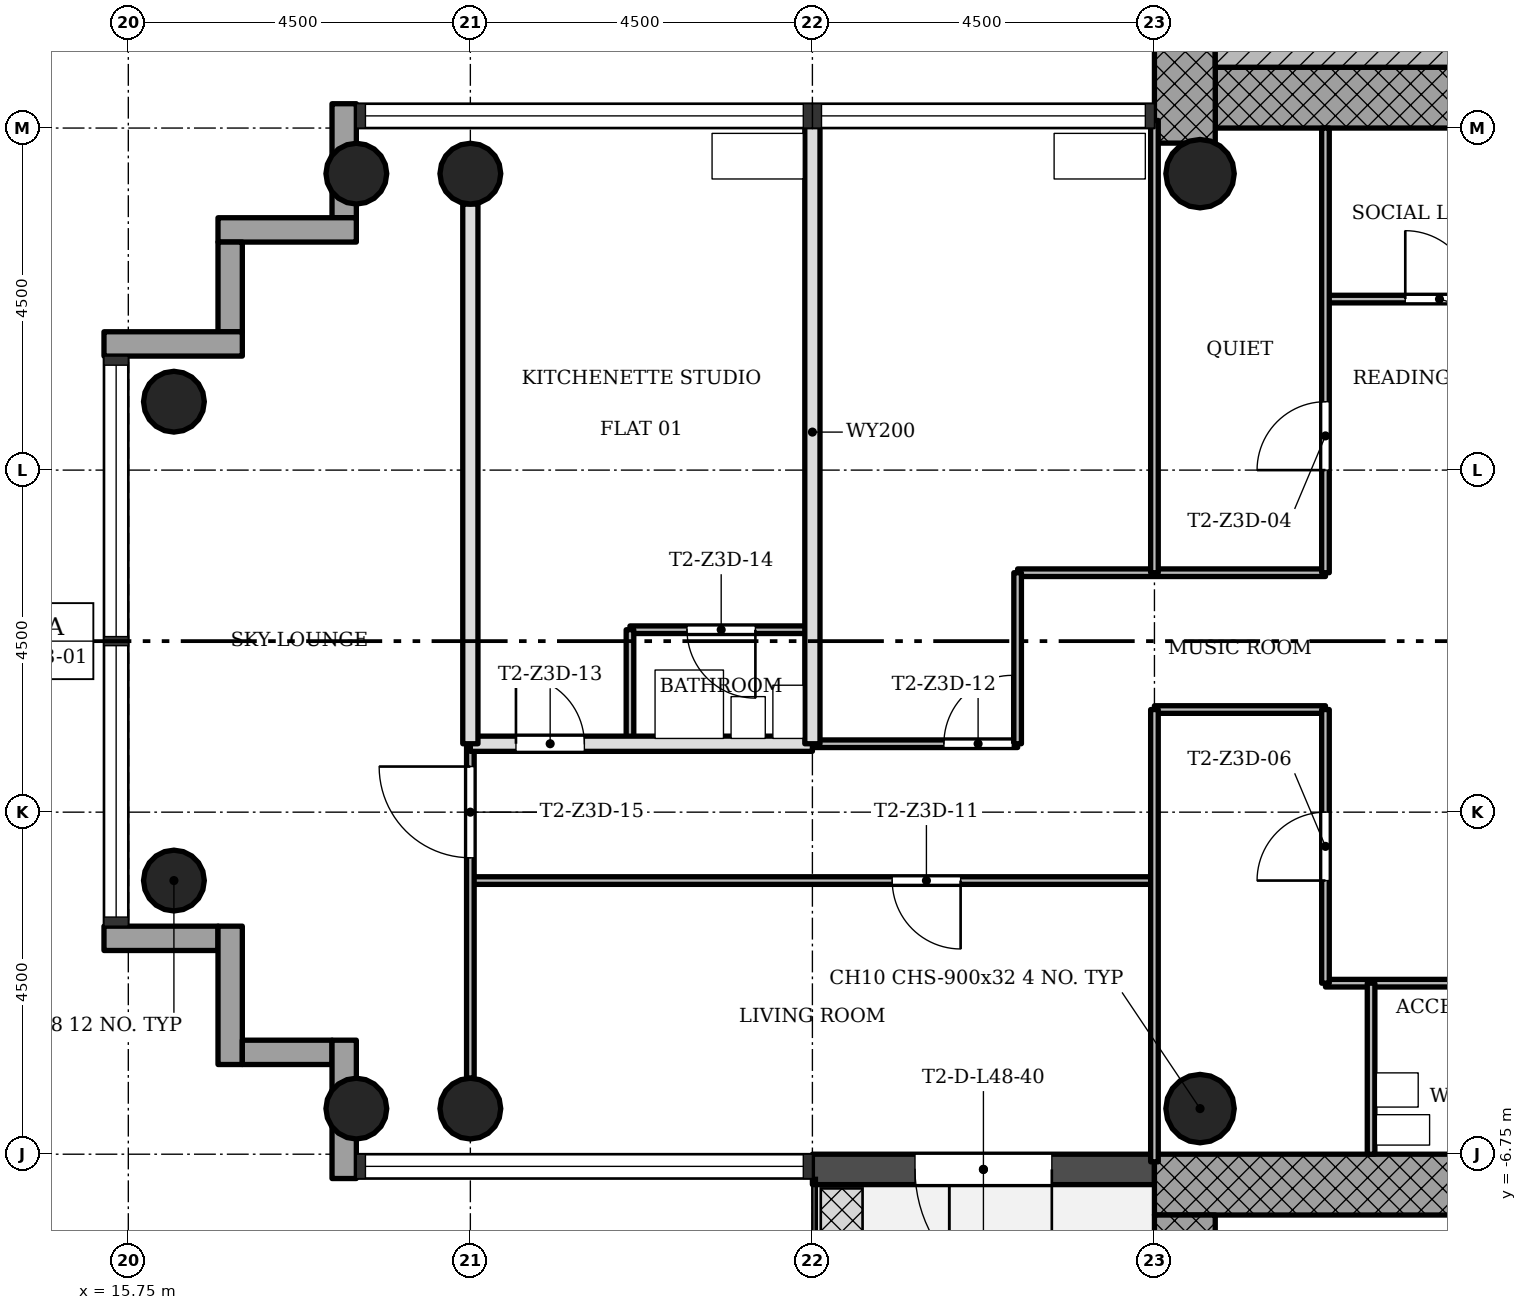
"""IFC4 building model, lengths in metres.
Left out: names, types, materials, properties, quantities, classifications, styles, units other than length and angle.
Written with IfcOpenShell. Run it as: python <this file> out.ifc"""

import sys

from ifc_helpers import new_model, si_unit, direction, frame, frame_2d, origin, origin_2d, place, context, subcontext, project, spatial, rectangle, hollow_circle, extrude, element, fill, save


model = new_model("IFC4")
c1 = context("Model", 3, precision=1e-05, world=origin(), true_north=direction((0.0, 1.0)))
c2 = subcontext(c1, "Body", "Model", "MODEL_VIEW")
j1 = project(units=[si_unit("LENGTHUNIT", "METRE"), si_unit("PLANEANGLEUNIT", "RADIAN")], contexts=[c1])
p1 = place(None, origin())
s1 = spatial("IfcSite", under=j1, at=p1, CompositionType="ELEMENT")
p2 = place(p1, origin())
s2 = spatial("IfcBuilding", under=s1, at=p2, CompositionType="ELEMENT")
p3 = place(p2, frame((0.0, 0.0, 174.5)))
s3 = spatial("IfcBuildingStorey", under=s2, at=p3, CompositionType="ELEMENT", Elevation=174.5)
p4 = place(p3, frame((30.05, 7.15, 0.0), z_axis=(0.0, 0.0, 1.0), x_axis=(1.0, 0.0, 0.0)))
e1 = element("IfcWall", 1, at=p4, inside=s3, PredefinedType="SHEAR", context=c2, shape_type="SweptSolid", body=[
    extrude(rectangle(XDim=12.7, YDim=0.8, at=frame_2d((6.35, 0.0))), origin(), (0.0, 0.0, 1.0), 3.4),
])
p5 = place(p4, frame((5.05, 0.0, 0.0)))
e2 = element("IfcOpeningElement", 2, at=p5, cuts=e1, PredefinedType="OPENING", context=c2, shape_type="SweptSolid", body=[
    extrude(rectangle(XDim=1.8, YDim=2.1, at=frame_2d((0.9, 1.05))), frame((0.0, 0.41, 0.0), z_axis=(0.0, -1.0, 0.0), x_axis=(1.0, 0.0, 0.0)), (0.0, 0.0, 1.0), 0.82),
])
p6 = place(p3, frame((29.65, 15.348, 0.0), z_axis=(0.0, 0.0, 1.0), x_axis=(0.0, -1.0, 0.0)))
e3 = element("IfcWall", 3, at=p6, inside=s3, PredefinedType="SHEAR", context=c2, shape_type="SweptSolid", body=[
    extrude(rectangle(XDim=8.796, YDim=0.8, at=frame_2d((4.398, 0.0))), origin(), (0.0, 0.0, 1.0), 3.4),
])
p7 = place(p3, frame((41.95, -7.15, 0.0), z_axis=(0.0, 0.0, 1.0), x_axis=(-1.0, 0.0, 0.0)))
e4 = element("IfcWall", 4, at=p7, inside=s3, PredefinedType="SHEAR", context=c2, shape_type="SweptSolid", body=[
    extrude(rectangle(XDim=12.7, YDim=0.8, at=frame_2d((6.35, 0.0))), origin(), (0.0, 0.0, 1.0), 3.4),
])
p8 = place(p7, frame((5.05, 0.0, 0.0)))
e5 = element("IfcOpeningElement", 5, at=p8, cuts=e4, PredefinedType="OPENING", context=c2, shape_type="SweptSolid", body=[
    extrude(rectangle(XDim=1.8, YDim=2.1, at=frame_2d((0.9, 1.05))), frame((0.0, 0.41, 0.0), z_axis=(0.0, -1.0, 0.0), x_axis=(1.0, 0.0, 0.0)), (0.0, 0.0, 1.0), 0.82),
])
p9 = place(p3, frame((29.65, -7.55, 0.0), z_axis=(0.0, 0.0, 1.0), x_axis=(0.0, -1.0, 0.0)))
e6 = element("IfcWall", 6, at=p9, inside=s3, PredefinedType="SHEAR", context=c2, shape_type="SweptSolid", body=[
    extrude(rectangle(XDim=8.2, YDim=0.8, at=frame_2d((4.1, 0.0))), origin(), (0.0, 0.0, 1.0), 3.4),
])
for number, where, z_axis, x_axis in (
    (7, (20.25, 6.15, 0.0), (0.0, 0.0, 1.0), (1.0, 0.0, 0.0)),
    (8, (20.25, -6.15, 0.0), (0.0, 0.0, 1.0), (1.0, 0.0, 0.0)),
    (9, (18.75, 6.15, 0.0), (0.0, 0.0, 1.0), (1.0, 0.0, 0.0)),
    (10, (18.75, -6.15, 0.0), (0.0, 0.0, 1.0), (1.0, 0.0, 0.0)),
    (11, (16.35, 3.15, 0.0), (0.0, 0.0, 1.0), (1.0, 0.0, 0.0)),
    (12, (16.35, -3.15, 0.0), (0.0, 0.0, 1.0), (1.0, 0.0, 0.0)),
):
    element("IfcColumn", number, at=place(p3, frame(where, z_axis=z_axis, x_axis=x_axis)), inside=s3, PredefinedType="COLUMN", context=c2, shape_type="SweptSolid", body=[
        extrude(hollow_circle(Radius=0.4, WallThickness=0.028, at=origin_2d()), origin(), (0.0, 0.0, 1.0), 3.4),
    ])
for number, where, z_axis, x_axis in (
    (13, (29.85, 6.15, 0.0), (0.0, 0.0, 1.0), (1.0, 0.0, 0.0)),
    (14, (29.85, -6.15, 0.0), (0.0, 0.0, 1.0), (1.0, 0.0, 0.0)),
):
    element("IfcColumn", number, at=place(p3, frame(where, z_axis=z_axis, x_axis=x_axis)), inside=s3, PredefinedType="COLUMN", context=c2, shape_type="SweptSolid", body=[
        extrude(hollow_circle(Radius=0.45, WallThickness=0.032, at=origin_2d()), origin(), (0.0, 0.0, 1.0), 3.4),
    ])
p10 = place(p3, frame((18.59, 7.07, -0.3), z_axis=(0.0, 0.0, 1.0), x_axis=(0.0, -1.0, 0.0)))
e15 = element("IfcWall", 15, at=p10, inside=s3, PredefinedType="STANDARD", context=c2, shape_type="SweptSolid", body=[
    extrude(rectangle(XDim=1.5, YDim=0.32, at=frame_2d((0.75, 0.0))), origin(), (0.0, 0.0, 1.0), 3.4),
])
p11 = place(p3, frame((18.75, 5.41, -0.3), z_axis=(0.0, 0.0, 1.0), x_axis=(-1.0, 0.0, 0.0)))
e16 = element("IfcWall", 16, at=p11, inside=s3, PredefinedType="STANDARD", context=c2, shape_type="SweptSolid", body=[
    extrude(rectangle(XDim=1.82, YDim=0.32, at=frame_2d((0.91, 0.0))), origin(), (0.0, 0.0, 1.0), 3.4),
])
p12 = place(p3, frame((17.09, 5.25, -0.3), z_axis=(0.0, 0.0, 1.0), x_axis=(0.0, -1.0, 0.0)))
e17 = element("IfcWall", 17, at=p12, inside=s3, PredefinedType="STANDARD", context=c2, shape_type="SweptSolid", body=[
    extrude(rectangle(XDim=1.18, YDim=0.32, at=frame_2d((0.59, 0.0))), origin(), (0.0, 0.0, 1.0), 3.4),
])
p13 = place(p3, frame((17.25, 3.91, -0.3), z_axis=(0.0, 0.0, 1.0), x_axis=(-1.0, 0.0, 0.0)))
e18 = element("IfcWall", 18, at=p13, inside=s3, PredefinedType="STANDARD", context=c2, shape_type="SweptSolid", body=[
    extrude(rectangle(XDim=1.82, YDim=0.32, at=frame_2d((0.91, 0.0))), origin(), (0.0, 0.0, 1.0), 3.4),
])
p14 = place(p3, frame((15.43, -3.91, -0.3), z_axis=(0.0, 0.0, 1.0), x_axis=(1.0, 0.0, 0.0)))
e19 = element("IfcWall", 19, at=p14, inside=s3, PredefinedType="STANDARD", context=c2, shape_type="SweptSolid", body=[
    extrude(rectangle(XDim=1.5, YDim=0.32, at=frame_2d((0.75, 0.0))), origin(), (0.0, 0.0, 1.0), 3.4),
])
p15 = place(p3, frame((17.09, -3.75, -0.3), z_axis=(0.0, 0.0, 1.0), x_axis=(0.0, -1.0, 0.0)))
e20 = element("IfcWall", 20, at=p15, inside=s3, PredefinedType="STANDARD", context=c2, shape_type="SweptSolid", body=[
    extrude(rectangle(XDim=1.82, YDim=0.32, at=frame_2d((0.91, 0.0))), origin(), (0.0, 0.0, 1.0), 3.4),
])
p16 = place(p3, frame((17.25, -5.41, -0.3), z_axis=(0.0, 0.0, 1.0), x_axis=(1.0, 0.0, 0.0)))
e21 = element("IfcWall", 21, at=p16, inside=s3, PredefinedType="STANDARD", context=c2, shape_type="SweptSolid", body=[
    extrude(rectangle(XDim=1.18, YDim=0.32, at=frame_2d((0.59, 0.0))), origin(), (0.0, 0.0, 1.0), 3.4),
])
p17 = place(p3, frame((18.59, -5.25, -0.3), z_axis=(0.0, 0.0, 1.0), x_axis=(0.0, -1.0, 0.0)))
e22 = element("IfcWall", 22, at=p17, inside=s3, PredefinedType="STANDARD", context=c2, shape_type="SweptSolid", body=[
    extrude(rectangle(XDim=1.82, YDim=0.32, at=frame_2d((0.91, 0.0))), origin(), (0.0, 0.0, 1.0), 3.4),
])
p18 = place(p3, frame((24.75, -6.95, -0.02), z_axis=(0.0, 0.0, 1.0), x_axis=(1.0, 0.0, 0.0)))
e23 = element("IfcWall", 23, at=p18, inside=s3, PredefinedType="STANDARD", context=c2, shape_type="SweptSolid", body=[
    extrude(rectangle(XDim=4.5, YDim=0.4, at=frame_2d((2.25, 0.0))), origin(), (0.0, 0.0, 1.0), 3.12),
])
p19 = place(p18, frame((1.35, 0.0, 0.02)))
e24 = element("IfcOpeningElement", 24, at=p19, cuts=e23, PredefinedType="OPENING", context=c2, shape_type="SweptSolid", body=[
    extrude(rectangle(XDim=1.8, YDim=2.1, at=frame_2d((0.9, 1.05))), frame((0.0, 0.21, 0.0), z_axis=(0.0, -1.0, 0.0), x_axis=(1.0, 0.0, 0.0)), (0.0, 0.0, 1.0), 0.42),
])
p20 = place(p3, frame((34.5, -4.5, 0.0), z_axis=(0.0, 0.0, 1.0), x_axis=(-1.0, 0.0, 0.0)))
e25 = element("IfcWall", 25, at=p20, inside=s3, PredefinedType="PARTITIONING", context=c2, shape_type="SweptSolid", body=[
    extrude(rectangle(XDim=3.0, YDim=0.1, at=frame_2d((1.5, 0.0))), origin(), (0.0, 0.0, 1.0), 3.0),
])
p21 = place(p3, frame((29.25, -3.15, 0.0), z_axis=(0.0, 0.0, 1.0), x_axis=(-1.0, 0.0, 0.0)))
e26 = element("IfcWall", 26, at=p21, inside=s3, PredefinedType="PARTITIONING", context=c2, shape_type="SweptSolid", body=[
    extrude(rectangle(XDim=9.0, YDim=0.1, at=frame_2d((4.5, 0.0))), origin(), (0.0, 0.0, 1.0), 3.0),
])
p22 = place(p21, frame((2.55, 0.0, 0.0)))
e27 = element("IfcOpeningElement", 27, at=p22, cuts=e26, PredefinedType="OPENING", context=c2, shape_type="SweptSolid", body=[
    extrude(rectangle(XDim=0.9, YDim=2.1, at=frame_2d((0.45, 1.05))), frame((0.0, 0.06, 0.0), z_axis=(0.0, -1.0, 0.0), x_axis=(1.0, 0.0, 0.0)), (0.0, 0.0, 1.0), 0.12),
])
p23 = place(p3, frame((27.45, -1.35, 0.0), z_axis=(0.0, 0.0, 1.0), x_axis=(-1.0, 0.0, 0.0)))
e28 = element("IfcWall", 28, at=p23, inside=s3, PredefinedType="PARTITIONING", context=c2, shape_type="SweptSolid", body=[
    extrude(rectangle(XDim=2.7, YDim=0.1, at=frame_2d((1.35, 0.0))), origin(), (0.0, 0.0, 1.0), 3.0),
])
p24 = place(p23, frame((0.07, 0.0, 0.0)))
e29 = element("IfcOpeningElement", 29, at=p24, cuts=e28, PredefinedType="OPENING", context=c2, shape_type="SweptSolid", body=[
    extrude(rectangle(XDim=0.9, YDim=2.1, at=frame_2d((0.45, 1.05))), frame((0.0, 0.06, 0.0), z_axis=(0.0, -1.0, 0.0), x_axis=(1.0, 0.0, 0.0)), (0.0, 0.0, 1.0), 0.12),
])
p25 = place(p3, frame((24.75, -1.35, 0.0), z_axis=(0.0, 0.0, 1.0), x_axis=(-1.0, 0.0, 0.0)))
e30 = element("IfcWall", 30, at=p25, inside=s3, PredefinedType="SOLIDWALL", context=c2, shape_type="SweptSolid", body=[
    extrude(rectangle(XDim=4.5, YDim=0.2, at=frame_2d((2.25, 0.0))), origin(), (0.0, 0.0, 1.0), 3.0),
])
p26 = place(p25, frame((3.0, 0.0, 0.0)))
e31 = element("IfcOpeningElement", 31, at=p26, cuts=e30, PredefinedType="OPENING", context=c2, shape_type="SweptSolid", body=[
    extrude(rectangle(XDim=0.9, YDim=2.1, at=frame_2d((0.45, 1.05))), frame((0.0, 0.11, 0.0), z_axis=(0.0, -1.0, 0.0), x_axis=(1.0, 0.0, 0.0)), (0.0, 0.0, 1.0), 0.22),
])
p27 = place(p3, frame((31.5, -0.9, 0.0), z_axis=(0.0, 0.0, 1.0), x_axis=(-1.0, 0.0, 0.0)))
e32 = element("IfcWall", 32, at=p27, inside=s3, PredefinedType="PARTITIONING", context=c2, shape_type="SweptSolid", body=[
    extrude(rectangle(XDim=2.25, YDim=0.1, at=frame_2d((1.125, 0.0))), origin(), (0.0, 0.0, 1.0), 3.0),
])
p28 = place(p3, frame((24.75, 0.15, 0.0), z_axis=(0.0, 0.0, 1.0), x_axis=(-1.0, 0.0, 0.0)))
e33 = element("IfcWall", 33, at=p28, inside=s3, PredefinedType="PARTITIONING", context=c2, shape_type="SweptSolid", body=[
    extrude(rectangle(XDim=2.4, YDim=0.1, at=frame_2d((1.2, 0.0))), origin(), (0.0, 0.0, 1.0), 3.0),
])
p29 = place(p28, frame((0.75, 0.0, 0.0)))
e34 = element("IfcOpeningElement", 34, at=p29, cuts=e33, PredefinedType="OPENING", context=c2, shape_type="SweptSolid", body=[
    extrude(rectangle(XDim=0.9, YDim=2.1, at=frame_2d((0.45, 1.05))), frame((0.0, 0.06, 0.0), z_axis=(0.0, -1.0, 0.0), x_axis=(1.0, 0.0, 0.0)), (0.0, 0.0, 1.0), 0.12),
])
p30 = place(p3, frame((31.5, 0.9, 0.0), z_axis=(0.0, 0.0, 1.0), x_axis=(-1.0, 0.0, 0.0)))
e35 = element("IfcWall", 35, at=p30, inside=s3, PredefinedType="PARTITIONING", context=c2, shape_type="SweptSolid", body=[
    extrude(rectangle(XDim=4.05, YDim=0.1, at=frame_2d((2.025, 0.0))), origin(), (0.0, 0.0, 1.0), 3.0),
])
p31 = place(p3, frame((34.5, 4.5, 0.0), z_axis=(0.0, 0.0, 1.0), x_axis=(-1.0, 0.0, 0.0)))
e36 = element("IfcWall", 36, at=p31, inside=s3, PredefinedType="PARTITIONING", context=c2, shape_type="SweptSolid", body=[
    extrude(rectangle(XDim=3.0, YDim=0.1, at=frame_2d((1.5, 0.0))), origin(), (0.0, 0.0, 1.0), 3.0),
])
p32 = place(p31, frame((1.05, 0.0, 0.0)))
e37 = element("IfcOpeningElement", 37, at=p32, cuts=e36, PredefinedType="OPENING", context=c2, shape_type="SweptSolid", body=[
    extrude(rectangle(XDim=0.9, YDim=2.1, at=frame_2d((0.45, 1.05))), frame((0.0, 0.06, 0.0), z_axis=(0.0, -1.0, 0.0), x_axis=(1.0, 0.0, 0.0)), (0.0, 0.0, 1.0), 0.12),
])
p33 = place(p3, frame((32.1, -6.75, 0.0), z_axis=(0.0, 0.0, 1.0), x_axis=(0.0, 1.0, 0.0)))
e38 = element("IfcWall", 38, at=p33, inside=s3, PredefinedType="PARTITIONING", context=c2, shape_type="SweptSolid", body=[
    extrude(rectangle(XDim=2.25, YDim=0.1, at=frame_2d((1.125, 0.0))), origin(), (0.0, 0.0, 1.0), 3.0),
])
p34 = place(p3, frame((31.5, -4.5, 0.0), z_axis=(0.0, 0.0, 1.0), x_axis=(0.0, 1.0, 0.0)))
e39 = element("IfcWall", 39, at=p34, inside=s3, PredefinedType="PARTITIONING", context=c2, shape_type="SweptSolid", body=[
    extrude(rectangle(XDim=3.6, YDim=0.1, at=frame_2d((1.8, 0.0))), origin(), (0.0, 0.0, 1.0), 3.0),
])
p35 = place(p34, frame((1.35, 0.0, 0.0)))
e40 = element("IfcOpeningElement", 40, at=p35, cuts=e39, PredefinedType="OPENING", context=c2, shape_type="SweptSolid", body=[
    extrude(rectangle(XDim=0.9, YDim=2.1, at=frame_2d((0.45, 1.05))), frame((0.0, 0.06, 0.0), z_axis=(0.0, -1.0, 0.0), x_axis=(1.0, 0.0, 0.0)), (0.0, 0.0, 1.0), 0.12),
])
p36 = place(p3, frame((31.5, 0.9, 0.0), z_axis=(0.0, 0.0, 1.0), x_axis=(0.0, 1.0, 0.0)))
e41 = element("IfcWall", 41, at=p36, inside=s3, PredefinedType="PARTITIONING", context=c2, shape_type="SweptSolid", body=[
    extrude(rectangle(XDim=5.85, YDim=0.1, at=frame_2d((2.925, 0.0))), origin(), (0.0, 0.0, 1.0), 3.0),
])
p37 = place(p36, frame((1.35, 0.0, 0.0)))
e42 = element("IfcOpeningElement", 42, at=p37, cuts=e41, PredefinedType="OPENING", context=c2, shape_type="SweptSolid", body=[
    extrude(rectangle(XDim=0.9, YDim=2.1, at=frame_2d((0.45, 1.05))), frame((0.0, 0.06, 0.0), z_axis=(0.0, -1.0, 0.0), x_axis=(1.0, 0.0, 0.0)), (0.0, 0.0, 1.0), 0.12),
])
for number, where, z_axis, x_axis in (
    (43, (29.25, -6.85, 0.0), (0.0, 0.0, 1.0), (0.0, 1.0, 0.0)),
    (44, (29.25, 0.9, 0.0), (0.0, 0.0, 1.0), (0.0, 1.0, 0.0)),
):
    element("IfcWall", number, at=place(p3, frame(where, z_axis=z_axis, x_axis=x_axis)), inside=s3, PredefinedType="PARTITIONING", context=c2, shape_type="SweptSolid", body=[
        extrude(rectangle(XDim=5.95, YDim=0.1, at=frame_2d((2.975, 0.0))), origin(), (0.0, 0.0, 1.0), 3.0),
    ])
p38 = place(p3, frame((27.45, -1.35, 0.0), z_axis=(0.0, 0.0, 1.0), x_axis=(0.0, 1.0, 0.0)))
e45 = element("IfcWall", 45, at=p38, inside=s3, PredefinedType="PARTITIONING", context=c2, shape_type="SweptSolid", body=[
    extrude(rectangle(XDim=2.25, YDim=0.1, at=frame_2d((1.125, 0.0))), origin(), (0.0, 0.0, 1.0), 3.0),
])
p39 = place(p3, frame((24.75, -1.35, 0.0), z_axis=(0.0, 0.0, 1.0), x_axis=(0.0, 1.0, 0.0)))
e46 = element("IfcWall", 46, at=p39, inside=s3, PredefinedType="SOLIDWALL", context=c2, shape_type="SweptSolid", body=[
    extrude(rectangle(XDim=8.2, YDim=0.2, at=frame_2d((4.1, 0.0))), origin(), (0.0, 0.0, 1.0), 3.0),
])
p40 = place(p3, frame((22.35, -1.35, 0.0), z_axis=(0.0, 0.0, 1.0), x_axis=(0.0, 1.0, 0.0)))
e47 = element("IfcWall", 47, at=p40, inside=s3, PredefinedType="PARTITIONING", context=c2, shape_type="SweptSolid", body=[
    extrude(rectangle(XDim=1.5, YDim=0.1, at=frame_2d((0.75, 0.0))), origin(), (0.0, 0.0, 1.0), 3.0),
])
p41 = place(p3, frame((20.25, -5.75, 0.0), z_axis=(0.0, 0.0, 1.0), x_axis=(0.0, 1.0, 0.0)))
e48 = element("IfcWall", 48, at=p41, inside=s3, PredefinedType="PARTITIONING", context=c2, shape_type="SweptSolid", body=[
    extrude(rectangle(XDim=4.4, YDim=0.1, at=frame_2d((2.2, 0.0))), origin(), (0.0, 0.0, 1.0), 3.0),
])
p42 = place(p41, frame((2.9, 0.0, 0.0)))
e49 = element("IfcOpeningElement", 49, at=p42, cuts=e48, PredefinedType="OPENING", context=c2, shape_type="SweptSolid", body=[
    extrude(rectangle(XDim=1.2, YDim=2.1, at=frame_2d((0.6, 1.05))), frame((0.0, 0.06, 0.0), z_axis=(0.0, -1.0, 0.0), x_axis=(1.0, 0.0, 0.0)), (0.0, 0.0, 1.0), 0.12),
])
p43 = place(p3, frame((20.25, -1.35, 0.0), z_axis=(0.0, 0.0, 1.0), x_axis=(0.0, 1.0, 0.0)))
e50 = element("IfcWall", 50, at=p43, inside=s3, PredefinedType="SOLIDWALL", context=c2, shape_type="SweptSolid", body=[
    extrude(rectangle(XDim=7.1, YDim=0.2, at=frame_2d((3.55, 0.0))), origin(), (0.0, 0.0, 1.0), 3.0),
])
p44 = place(p3, frame((34.15, 7.75, 0.0), z_axis=(0.0, 0.0, 1.0), x_axis=(-1.0, 0.0, 0.0)))
e51 = element("IfcWall", 51, at=p44, inside=s3, PredefinedType="SHEAR", context=c2, shape_type="SweptSolid", body=[
    extrude(rectangle(XDim=4.1, YDim=0.4, at=frame_2d((2.05, 0.0))), origin(), (0.0, 0.0, 1.0), 3.4),
])
p45 = place(p19, origin())
e52 = element("IfcDoor", 52, at=p45, inside=s3, OperationType="SINGLE_SWING_RIGHT", PredefinedType="DOOR", context=c2, shape_type="SweptSolid", body=[
    extrude(rectangle(XDim=1.8, YDim=2.1, at=frame_2d((0.9, 1.05))), frame((0.0, 0.025, 0.0), z_axis=(0.0, -1.0, 0.0), x_axis=(1.0, 0.0, 0.0)), (0.0, 0.0, 1.0), 0.05),
])
fill(e24, e52)
p46 = place(p37, origin())
e53 = element("IfcDoor", 53, at=p46, inside=s3, OperationType="SINGLE_SWING_RIGHT", PredefinedType="DOOR", context=c2, shape_type="SweptSolid", body=[
    extrude(rectangle(XDim=0.9, YDim=2.1, at=frame_2d((0.45, 1.05))), frame((0.0, 0.025, 0.0), z_axis=(0.0, -1.0, 0.0), x_axis=(1.0, 0.0, 0.0)), (0.0, 0.0, 1.0), 0.05),
])
fill(e42, e53)
p47 = place(p32, origin())
e54 = element("IfcDoor", 54, at=p47, inside=s3, OperationType="SINGLE_SWING_RIGHT", PredefinedType="DOOR", context=c2, shape_type="SweptSolid", body=[
    extrude(rectangle(XDim=0.9, YDim=2.1, at=frame_2d((0.45, 1.05))), frame((0.0, 0.025, 0.0), z_axis=(0.0, -1.0, 0.0), x_axis=(1.0, 0.0, 0.0)), (0.0, 0.0, 1.0), 0.05),
])
fill(e37, e54)
p48 = place(p35, origin())
e55 = element("IfcDoor", 55, at=p48, inside=s3, OperationType="SINGLE_SWING_RIGHT", PredefinedType="DOOR", context=c2, shape_type="SweptSolid", body=[
    extrude(rectangle(XDim=0.9, YDim=2.1, at=frame_2d((0.45, 1.05))), frame((0.0, 0.025, 0.0), z_axis=(0.0, -1.0, 0.0), x_axis=(1.0, 0.0, 0.0)), (0.0, 0.0, 1.0), 0.05),
])
fill(e40, e55)
p49 = place(p22, origin())
e56 = element("IfcDoor", 56, at=p49, inside=s3, OperationType="SINGLE_SWING_RIGHT", PredefinedType="DOOR", context=c2, shape_type="SweptSolid", body=[
    extrude(rectangle(XDim=0.9, YDim=2.1, at=frame_2d((0.45, 1.05))), frame((0.0, 0.025, 0.0), z_axis=(0.0, -1.0, 0.0), x_axis=(1.0, 0.0, 0.0)), (0.0, 0.0, 1.0), 0.05),
])
fill(e27, e56)
p50 = place(p24, origin())
e57 = element("IfcDoor", 57, at=p50, inside=s3, OperationType="SINGLE_SWING_LEFT", PredefinedType="DOOR", context=c2, shape_type="SweptSolid", body=[
    extrude(rectangle(XDim=0.9, YDim=2.1, at=frame_2d((0.45, 1.05))), frame((0.0, 0.025, 0.0), z_axis=(0.0, -1.0, 0.0), x_axis=(1.0, 0.0, 0.0)), (0.0, 0.0, 1.0), 0.05),
])
fill(e29, e57)
p51 = place(p26, origin())
e58 = element("IfcDoor", 58, at=p51, inside=s3, OperationType="SINGLE_SWING_RIGHT", PredefinedType="DOOR", context=c2, shape_type="SweptSolid", body=[
    extrude(rectangle(XDim=0.9, YDim=2.1, at=frame_2d((0.45, 1.05))), frame((0.0, 0.025, 0.0), z_axis=(0.0, -1.0, 0.0), x_axis=(1.0, 0.0, 0.0)), (0.0, 0.0, 1.0), 0.05),
])
fill(e31, e58)
p52 = place(p29, origin())
e59 = element("IfcDoor", 59, at=p52, inside=s3, OperationType="SINGLE_SWING_RIGHT", PredefinedType="DOOR", context=c2, shape_type="SweptSolid", body=[
    extrude(rectangle(XDim=0.9, YDim=2.1, at=frame_2d((0.45, 1.05))), frame((0.0, 0.025, 0.0), z_axis=(0.0, -1.0, 0.0), x_axis=(1.0, 0.0, 0.0)), (0.0, 0.0, 1.0), 0.05),
])
fill(e34, e59)
p53 = place(p42, origin())
e60 = element("IfcDoor", 60, at=p53, inside=s3, OperationType="SINGLE_SWING_LEFT", PredefinedType="DOOR", context=c2, shape_type="SweptSolid", body=[
    extrude(rectangle(XDim=1.2, YDim=2.1, at=frame_2d((0.6, 1.05))), frame((0.0, 0.025, 0.0), z_axis=(0.0, -1.0, 0.0), x_axis=(1.0, 0.0, 0.0)), (0.0, 0.0, 1.0), 0.05),
])
fill(e49, e60)
save(model, sys.argv[1])
